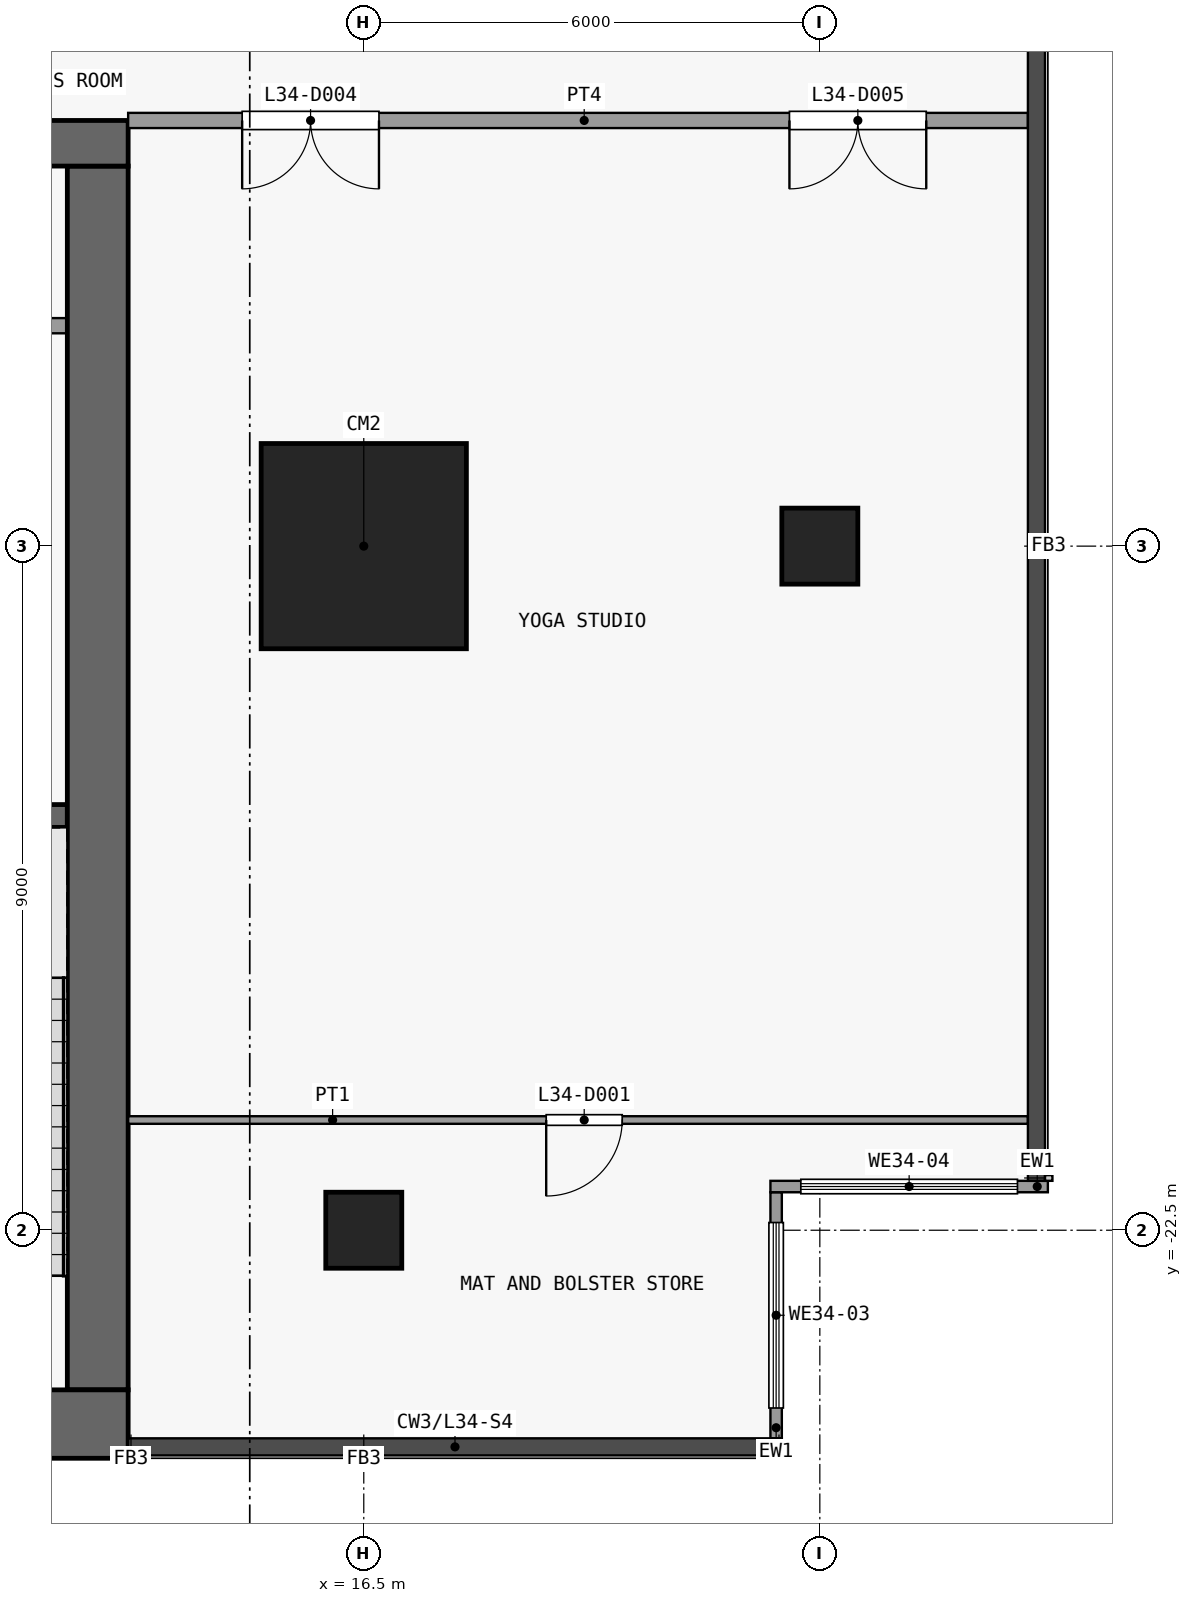
"""IFC4 building model, lengths in metres.
Left out: names, types, materials, properties, quantities, classifications, styles, units other than length and angle.
Written with IfcOpenShell. Run it as: python <this file> out.ifc"""

import sys

from ifc_helpers import new_model, si_unit, direction, frame, frame_2d, origin, origin_2d, place, context, subcontext, project, spatial, rectangle, extrude, element, fill, save


model = new_model("IFC4")
c1 = context("Model", 3, precision=1e-05, world=origin(), true_north=direction((0.0, 1.0)))
c2 = subcontext(c1, "Body", "Model", "MODEL_VIEW")
j1 = project(units=[si_unit("LENGTHUNIT", "METRE"), si_unit("PLANEANGLEUNIT", "RADIAN")], contexts=[c1])
p1 = place(None, origin())
s1 = spatial("IfcSite", under=j1, at=p1, CompositionType="ELEMENT")
p2 = place(p1, origin())
s2 = spatial("IfcBuilding", under=s1, at=p2, CompositionType="ELEMENT")
p3 = place(p2, frame((0.0, 0.0, 138.9)))
s3 = spatial("IfcBuildingStorey", under=s2, at=p3, CompositionType="ELEMENT", Elevation=138.9)
p4 = place(p3, frame((16.5, -22.5, 0.0), z_axis=(0.0, 0.0, 1.0), x_axis=(1.0, 0.0, 0.0)))
e1 = element("IfcColumn", 1, at=p4, inside=s3, PredefinedType="COLUMN", context=c2, shape_type="SweptSolid", body=[
    extrude(rectangle(XDim=1.0, YDim=1.0, at=origin_2d()), origin(), (0.0, 0.0, 1.0), 5.0),
])
p5 = place(p3, frame((16.5, -13.5, 0.0), z_axis=(0.0, 0.0, 1.0), x_axis=(1.0, 0.0, 0.0)))
e2 = element("IfcColumn", 2, at=p5, inside=s3, PredefinedType="COLUMN", context=c2, shape_type="SweptSolid", body=[
    extrude(rectangle(XDim=2.7, YDim=2.7, at=origin_2d()), origin(), (0.0, 0.0, 1.0), 5.0),
])
p6 = place(p3, frame((22.5, -13.5, 0.0), z_axis=(0.0, 0.0, 1.0), x_axis=(1.0, 0.0, 0.0)))
e3 = element("IfcColumn", 3, at=p6, inside=s3, PredefinedType="COLUMN", context=c2, shape_type="SweptSolid", body=[
    extrude(rectangle(XDim=1.0, YDim=1.0, at=origin_2d()), origin(), (0.0, 0.0, 1.0), 5.0),
])
p7 = place(p3, frame((-13.4, -25.05, 0.0), z_axis=(0.0, 0.0, 1.0), x_axis=(1.0, 0.0, 0.0)))
e4 = element("IfcWall", 4, at=p7, inside=s3, PredefinedType="SHEAR", context=c2, shape_type="SweptSolid", body=[
    extrude(rectangle(XDim=26.8, YDim=0.9, at=frame_2d((13.4, 0.0))), origin(), (0.0, 0.0, 1.0), 4.55),
])
p8 = place(p3, frame((-13.4, -8.2, 0.0), z_axis=(0.0, 0.0, 1.0), x_axis=(1.0, 0.0, 0.0)))
e5 = element("IfcWall", 5, at=p8, inside=s3, PredefinedType="SHEAR", context=c2, shape_type="SweptSolid", body=[
    extrude(rectangle(XDim=26.8, YDim=0.6, at=frame_2d((13.4, 0.0))), origin(), (0.0, 0.0, 1.0), 4.55),
])
p9 = place(p8, frame((7.7, 0.0, 0.0)))
e6 = element("IfcOpeningElement", 6, at=p9, cuts=e5, PredefinedType="OPENING", context=c2, shape_type="SweptSolid", body=[
    extrude(rectangle(XDim=1.8, YDim=2.1, at=frame_2d((0.9, 1.05))), frame((0.0, 0.31, 0.0), z_axis=(0.0, -1.0, 0.0), x_axis=(1.0, 0.0, 0.0)), (0.0, 0.0, 1.0), 0.62),
])
p10 = place(p8, frame((17.3, 0.0, 0.0)))
e7 = element("IfcOpeningElement", 7, at=p10, cuts=e5, PredefinedType="OPENING", context=c2, shape_type="SweptSolid", body=[
    extrude(rectangle(XDim=1.8, YDim=2.1, at=frame_2d((0.9, 1.05))), frame((0.0, 0.31, 0.0), z_axis=(0.0, -1.0, 0.0), x_axis=(1.0, 0.0, 0.0)), (0.0, 0.0, 1.0), 0.62),
])
p11 = place(p8, frame((2.625, 0.0, 0.0)))
e8 = element("IfcOpeningElement", 8, at=p11, cuts=e5, PredefinedType="OPENING", context=c2, shape_type="SweptSolid", body=[
    extrude(rectangle(XDim=0.9, YDim=2.1, at=frame_2d((0.45, 1.05))), frame((0.0, 0.31, 0.0), z_axis=(0.0, -1.0, 0.0), x_axis=(1.0, 0.0, 0.0)), (0.0, 0.0, 1.0), 0.62),
])
p12 = place(p8, frame((23.275, 0.0, 0.0)))
e9 = element("IfcOpeningElement", 9, at=p12, cuts=e5, PredefinedType="OPENING", context=c2, shape_type="SweptSolid", body=[
    extrude(rectangle(XDim=0.9, YDim=2.1, at=frame_2d((0.45, 1.05))), frame((0.0, 0.31, 0.0), z_axis=(0.0, -1.0, 0.0), x_axis=(1.0, 0.0, 0.0)), (0.0, 0.0, 1.0), 0.62),
])
p13 = place(p3, frame((13.0, -24.6, 0.0), z_axis=(0.0, 0.0, 1.0), x_axis=(0.0, 1.0, 0.0)))
e10 = element("IfcWall", 10, at=p13, inside=s3, PredefinedType="SHEAR", context=c2, shape_type="SweptSolid", body=[
    extrude(rectangle(XDim=16.1, YDim=0.8, at=frame_2d((8.05, 0.0))), origin(), (0.0, 0.0, 1.0), 4.55),
])
p14 = place(p3, frame((9.5, -17.05, 0.0), z_axis=(0.0, 0.0, 1.0), x_axis=(1.0, 0.0, 0.0)))
e11 = element("IfcWall", 11, at=p14, inside=s3, PredefinedType="SHEAR", context=c2, shape_type="SweptSolid", body=[
    extrude(rectangle(XDim=3.1, YDim=0.3, at=frame_2d((1.55, 0.0))), origin(), (0.0, 0.0, 1.0), 4.55),
])
p15 = place(p3, frame((11.15, -10.6, 0.0), z_axis=(0.0, 0.0, 1.0), x_axis=(1.0, 0.0, 0.0)))
e12 = element("IfcWall", 12, at=p15, inside=s3, PredefinedType="PARTITIONING", context=c2, shape_type="SweptSolid", body=[
    extrude(rectangle(XDim=1.45, YDim=0.2, at=frame_2d((0.725, 0.0))), origin(), (0.0, 0.0, 1.0), 4.55),
])
p16 = place(p3, frame((21.925, -22.0, 0.0), z_axis=(0.0, 0.0, 1.0), x_axis=(0.0, -1.0, 0.0)))
e13 = element("IfcWall", 13, at=p16, inside=s3, PredefinedType="SOLIDWALL", context=c2, shape_type="SweptSolid", body=[
    extrude(rectangle(XDim=3.238, YDim=0.15, at=frame_2d((1.619, 0.0))), origin(), (0.0, 0.0, 1.0), 4.55),
])
p17 = place(p16, frame((0.399, 0.0, 0.9)))
e14 = element("IfcOpeningElement", 14, at=p17, cuts=e13, PredefinedType="OPENING", context=c2, shape_type="SweptSolid", body=[
    extrude(rectangle(XDim=2.44, YDim=2.4, at=frame_2d((1.22, 1.2))), frame((0.0, 0.085, 0.0), z_axis=(0.0, -1.0, 0.0), x_axis=(1.0, 0.0, 0.0)), (0.0, 0.0, 1.0), 0.17),
])
p18 = place(p3, frame((25.5, -21.925, 0.0), z_axis=(0.0, 0.0, 1.0), x_axis=(-1.0, 0.0, 0.0)))
e15 = element("IfcWall", 15, at=p18, inside=s3, PredefinedType="SOLIDWALL", context=c2, shape_type="SweptSolid", body=[
    extrude(rectangle(XDim=3.65, YDim=0.15, at=frame_2d((1.825, 0.0))), origin(), (0.0, 0.0, 1.0), 4.55),
])
p19 = place(p18, frame((0.4, 0.0, 0.9)))
e16 = element("IfcOpeningElement", 16, at=p19, cuts=e15, PredefinedType="OPENING", context=c2, shape_type="SweptSolid", body=[
    extrude(rectangle(XDim=2.85, YDim=2.4, at=frame_2d((1.425, 1.2))), frame((0.0, 0.085, 0.0), z_axis=(0.0, -1.0, 0.0), x_axis=(1.0, 0.0, 0.0)), (0.0, 0.0, 1.0), 0.17),
])
p20 = place(p3, frame((13.4, -21.05, 0.0), z_axis=(0.0, 0.0, 1.0), x_axis=(1.0, 0.0, 0.0)))
e17 = element("IfcWall", 17, at=p20, inside=s3, PredefinedType="PARTITIONING", context=c2, shape_type="SweptSolid", body=[
    extrude(rectangle(XDim=11.838, YDim=0.1, at=frame_2d((5.919, 0.0))), origin(), (0.0, 0.0, 1.0), 4.55),
])
p21 = place(p20, frame((5.5, 0.0, 0.0)))
e18 = element("IfcOpeningElement", 18, at=p21, cuts=e17, PredefinedType="OPENING", context=c2, shape_type="SweptSolid", body=[
    extrude(rectangle(XDim=1.0, YDim=2.1, at=frame_2d((0.5, 1.05))), frame((0.0, 0.06, 0.0), z_axis=(0.0, -1.0, 0.0), x_axis=(1.0, 0.0, 0.0)), (0.0, 0.0, 1.0), 0.12),
])
p22 = place(p3, frame((13.4, -7.9, 0.0), z_axis=(0.0, 0.0, 1.0), x_axis=(1.0, 0.0, 0.0)))
e19 = element("IfcWall", 19, at=p22, inside=s3, PredefinedType="PARTITIONING", context=c2, shape_type="SweptSolid", body=[
    extrude(rectangle(XDim=11.838, YDim=0.2, at=frame_2d((5.919, 0.0))), origin(), (0.0, 0.0, 1.0), 4.55),
])
p23 = place(p22, frame((1.5, 0.0, 0.0)))
e20 = element("IfcOpeningElement", 20, at=p23, cuts=e19, PredefinedType="OPENING", context=c2, shape_type="SweptSolid", body=[
    extrude(rectangle(XDim=1.8, YDim=2.1, at=frame_2d((0.9, 1.05))), frame((0.0, 0.11, 0.0), z_axis=(0.0, -1.0, 0.0), x_axis=(1.0, 0.0, 0.0)), (0.0, 0.0, 1.0), 0.22),
])
p24 = place(p22, frame((8.7, 0.0, 0.0)))
e21 = element("IfcOpeningElement", 21, at=p24, cuts=e19, PredefinedType="OPENING", context=c2, shape_type="SweptSolid", body=[
    extrude(rectangle(XDim=1.8, YDim=2.1, at=frame_2d((0.9, 1.05))), frame((0.0, 0.11, 0.0), z_axis=(0.0, -1.0, 0.0), x_axis=(1.0, 0.0, 0.0)), (0.0, 0.0, 1.0), 0.22),
])
p25 = place(p17, origin())
e22 = element("IfcWindow", 22, at=p25, inside=s3, PartitioningType="SINGLE_PANEL", PredefinedType="WINDOW", context=c2, shape_type="SweptSolid", body=[
    extrude(rectangle(XDim=2.44, YDim=2.4, at=frame_2d((1.22, 1.2))), frame((0.0, 0.03, 0.0), z_axis=(0.0, -1.0, 0.0), x_axis=(1.0, 0.0, 0.0)), (0.0, 0.0, 1.0), 0.06),
])
fill(e14, e22)
p26 = place(p19, origin())
e23 = element("IfcWindow", 23, at=p26, inside=s3, PartitioningType="SINGLE_PANEL", PredefinedType="WINDOW", context=c2, shape_type="SweptSolid", body=[
    extrude(rectangle(XDim=2.85, YDim=2.4, at=frame_2d((1.425, 1.2))), frame((0.0, 0.03, 0.0), z_axis=(0.0, -1.0, 0.0), x_axis=(1.0, 0.0, 0.0)), (0.0, 0.0, 1.0), 0.06),
])
fill(e16, e23)
p27 = place(p21, origin())
e24 = element("IfcDoor", 24, at=p27, inside=s3, OperationType="SINGLE_SWING_LEFT", PredefinedType="DOOR", context=c2, shape_type="SweptSolid", body=[
    extrude(rectangle(XDim=1.0, YDim=2.1, at=frame_2d((0.5, 1.05))), frame((0.0, 0.025, 0.0), z_axis=(0.0, -1.0, 0.0), x_axis=(1.0, 0.0, 0.0)), (0.0, 0.0, 1.0), 0.05),
])
fill(e18, e24)
p28 = place(p23, origin())
e25 = element("IfcDoor", 25, at=p28, inside=s3, OperationType="DOUBLE_DOOR_SINGLE_SWING", PredefinedType="DOOR", context=c2, shape_type="SweptSolid", body=[
    extrude(rectangle(XDim=1.8, YDim=2.1, at=frame_2d((0.9, 1.05))), frame((0.0, 0.025, 0.0), z_axis=(0.0, -1.0, 0.0), x_axis=(1.0, 0.0, 0.0)), (0.0, 0.0, 1.0), 0.05),
])
fill(e20, e25)
p29 = place(p24, origin())
e26 = element("IfcDoor", 26, at=p29, inside=s3, OperationType="DOUBLE_DOOR_SINGLE_SWING", PredefinedType="DOOR", context=c2, shape_type="SweptSolid", body=[
    extrude(rectangle(XDim=1.8, YDim=2.1, at=frame_2d((0.9, 1.05))), frame((0.0, 0.025, 0.0), z_axis=(0.0, -1.0, 0.0), x_axis=(1.0, 0.0, 0.0)), (0.0, 0.0, 1.0), 0.05),
])
fill(e21, e26)
save(model, sys.argv[1])
